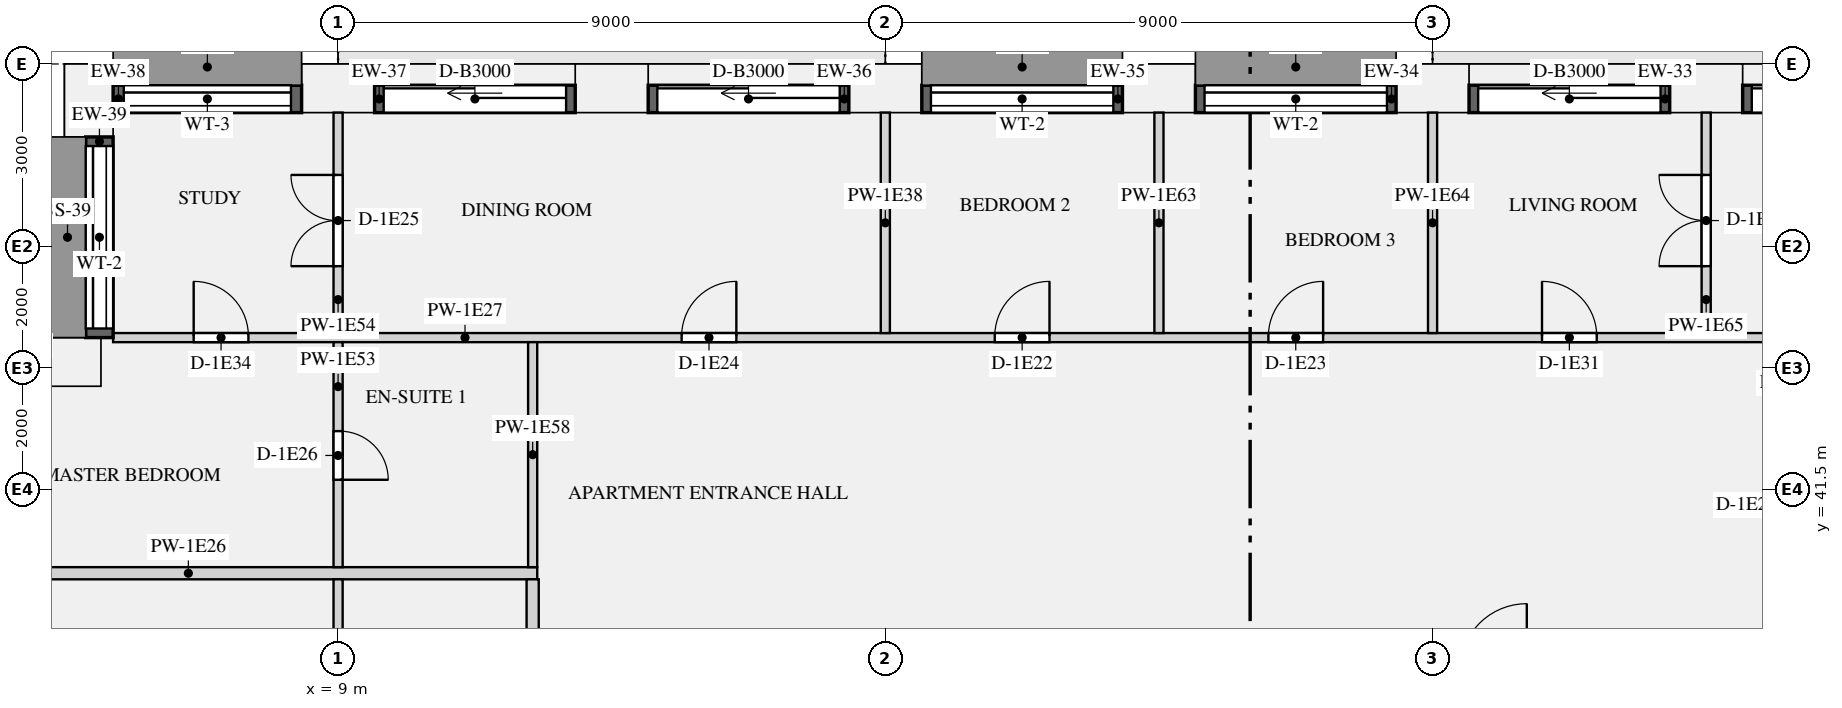
"""IFC4 building model, lengths in metres.
Left out: names, types, materials, properties, quantities, classifications, styles, units other than length and angle.
Written with IfcOpenShell. Run it as: python <this file> out.ifc"""

import sys

from ifc_helpers import new_model, si_unit, direction, frame, frame_2d, origin, origin_2d, place, context, subcontext, project, spatial, rectangle, extrude, element, fill, save


model = new_model("IFC4")
c1 = context("Model", 3, precision=1e-05, world=origin(), true_north=direction((0.0, 1.0)))
c2 = subcontext(c1, "Body", "Model", "MODEL_VIEW")
j1 = project(units=[si_unit("LENGTHUNIT", "METRE"), si_unit("PLANEANGLEUNIT", "RADIAN")], contexts=[c1])
p1 = place(None, origin())
s1 = spatial("IfcSite", under=j1, at=p1, CompositionType="ELEMENT")
p2 = place(p1, origin())
s2 = spatial("IfcBuilding", under=s1, at=p2, CompositionType="ELEMENT")
p3 = place(p2, frame((0.0, 0.0, 54.15)))
s3 = spatial("IfcBuildingStorey", under=s2, at=p3, CompositionType="ELEMENT", Elevation=54.15)
for number, where, z_axis, x_axis in (
    (1, (31.5, 48.1, 0.0), (0.0, 0.0, 1.0), (-1.0, 0.0, 0.0)),
    (2, (27.0, 48.1, 0.0), (0.0, 0.0, 1.0), (-1.0, 0.0, 0.0)),
    (3, (22.5, 48.1, 0.0), (0.0, 0.0, 1.0), (-1.0, 0.0, 0.0)),
    (4, (18.0, 48.1, 0.0), (0.0, 0.0, 1.0), (-1.0, 0.0, 0.0)),
    (5, (13.5, 48.1, 0.0), (0.0, 0.0, 1.0), (-1.0, 0.0, 0.0)),
    (6, (9.0, 48.1, 0.0), (0.0, 0.0, 1.0), (-1.0, 0.0, 0.0)),
    (7, (4.9, 47.9, 0.0), (0.0, 0.0, 1.0), (0.0, -1.0, 0.0)),
    (8, (4.5, 43.6, 0.0), (0.0, 0.0, 1.0), (-1.0, 0.0, 0.0)),
):
    element("IfcColumn", number, at=place(p3, frame(where, z_axis=z_axis, x_axis=x_axis)), inside=s3, PredefinedType="USERDEFINED", context=c2, shape_type="SweptSolid", body=[
        extrude(rectangle(XDim=1.2, YDim=0.8, at=origin_2d()), origin(), (0.0, 0.0, 1.0), 3.15),
    ])
p4 = place(p3, frame((35.4, 47.925, 0.0), z_axis=(0.0, 0.0, 1.0), x_axis=(-1.0, 0.0, 0.0)))
e9 = element("IfcWall", 9, at=p4, inside=s3, PredefinedType="SOLIDWALL", context=c2, shape_type="SweptSolid", body=[
    extrude(rectangle(XDim=3.3, YDim=0.45, at=frame_2d((1.65, 0.0))), origin(), (0.0, 0.0, 1.0), 2.83),
])
p5 = place(p4, frame((0.15, 0.0, 0.0)))
e10 = element("IfcOpeningElement", 10, at=p5, cuts=e9, PredefinedType="OPENING", context=c2, shape_type="SweptSolid", body=[
    extrude(rectangle(XDim=3.0, YDim=2.3, at=frame_2d((1.5, 1.15))), frame((0.0, 0.235, 0.0), z_axis=(0.0, -1.0, 0.0), x_axis=(1.0, 0.0, 0.0)), (0.0, 0.0, 1.0), 0.47),
])
p6 = place(p3, frame((30.9, 47.925, 0.0), z_axis=(0.0, 0.0, 1.0), x_axis=(-1.0, 0.0, 0.0)))
e11 = element("IfcWall", 11, at=p6, inside=s3, PredefinedType="SOLIDWALL", context=c2, shape_type="SweptSolid", body=[
    extrude(rectangle(XDim=3.3, YDim=0.45, at=frame_2d((1.65, 0.0))), origin(), (0.0, 0.0, 1.0), 2.83),
])
p7 = place(p6, frame((0.15, 0.0, 0.0)))
e12 = element("IfcOpeningElement", 12, at=p7, cuts=e11, PredefinedType="OPENING", context=c2, shape_type="SweptSolid", body=[
    extrude(rectangle(XDim=3.0, YDim=2.3, at=frame_2d((1.5, 1.15))), frame((0.0, 0.235, 0.0), z_axis=(0.0, -1.0, 0.0), x_axis=(1.0, 0.0, 0.0)), (0.0, 0.0, 1.0), 0.47),
])
p8 = place(p3, frame((26.4, 47.925, 0.9), z_axis=(0.0, 0.0, 1.0), x_axis=(-1.0, 0.0, 0.0)))
e13 = element("IfcWall", 13, at=p8, inside=s3, PredefinedType="SOLIDWALL", context=c2, shape_type="SweptSolid", body=[
    extrude(rectangle(XDim=3.3, YDim=0.45, at=frame_2d((1.65, 0.0))), origin(), (0.0, 0.0, 1.0), 1.93),
])
p9 = place(p8, frame((0.15, 0.0, 0.15)))
e14 = element("IfcOpeningElement", 14, at=p9, cuts=e13, PredefinedType="OPENING", context=c2, shape_type="SweptSolid", body=[
    extrude(rectangle(XDim=3.0, YDim=1.5, at=frame_2d((1.5, 0.75))), frame((0.0, 0.235, 0.0), z_axis=(0.0, -1.0, 0.0), x_axis=(1.0, 0.0, 0.0)), (0.0, 0.0, 1.0), 0.47),
])
p10 = place(p3, frame((21.9, 47.925, 0.9), z_axis=(0.0, 0.0, 1.0), x_axis=(-1.0, 0.0, 0.0)))
e15 = element("IfcWall", 15, at=p10, inside=s3, PredefinedType="SOLIDWALL", context=c2, shape_type="SweptSolid", body=[
    extrude(rectangle(XDim=3.3, YDim=0.45, at=frame_2d((1.65, 0.0))), origin(), (0.0, 0.0, 1.0), 1.93),
])
p11 = place(p10, frame((0.15, 0.0, 0.15)))
e16 = element("IfcOpeningElement", 16, at=p11, cuts=e15, PredefinedType="OPENING", context=c2, shape_type="SweptSolid", body=[
    extrude(rectangle(XDim=3.0, YDim=1.5, at=frame_2d((1.5, 0.75))), frame((0.0, 0.235, 0.0), z_axis=(0.0, -1.0, 0.0), x_axis=(1.0, 0.0, 0.0)), (0.0, 0.0, 1.0), 0.47),
])
p12 = place(p3, frame((17.4, 47.925, 0.0), z_axis=(0.0, 0.0, 1.0), x_axis=(-1.0, 0.0, 0.0)))
e17 = element("IfcWall", 17, at=p12, inside=s3, PredefinedType="SOLIDWALL", context=c2, shape_type="SweptSolid", body=[
    extrude(rectangle(XDim=3.3, YDim=0.45, at=frame_2d((1.65, 0.0))), origin(), (0.0, 0.0, 1.0), 2.83),
])
p13 = place(p12, frame((0.15, 0.0, 0.0)))
e18 = element("IfcOpeningElement", 18, at=p13, cuts=e17, PredefinedType="OPENING", context=c2, shape_type="SweptSolid", body=[
    extrude(rectangle(XDim=3.0, YDim=2.3, at=frame_2d((1.5, 1.15))), frame((0.0, 0.235, 0.0), z_axis=(0.0, -1.0, 0.0), x_axis=(1.0, 0.0, 0.0)), (0.0, 0.0, 1.0), 0.47),
])
p14 = place(p3, frame((12.9, 47.925, 0.0), z_axis=(0.0, 0.0, 1.0), x_axis=(-1.0, 0.0, 0.0)))
e19 = element("IfcWall", 19, at=p14, inside=s3, PredefinedType="SOLIDWALL", context=c2, shape_type="SweptSolid", body=[
    extrude(rectangle(XDim=3.3, YDim=0.45, at=frame_2d((1.65, 0.0))), origin(), (0.0, 0.0, 1.0), 2.83),
])
p15 = place(p14, frame((0.15, 0.0, 0.0)))
e20 = element("IfcOpeningElement", 20, at=p15, cuts=e19, PredefinedType="OPENING", context=c2, shape_type="SweptSolid", body=[
    extrude(rectangle(XDim=3.0, YDim=2.3, at=frame_2d((1.5, 1.15))), frame((0.0, 0.235, 0.0), z_axis=(0.0, -1.0, 0.0), x_axis=(1.0, 0.0, 0.0)), (0.0, 0.0, 1.0), 0.47),
])
p16 = place(p3, frame((8.4, 47.925, 0.9), z_axis=(0.0, 0.0, 1.0), x_axis=(-1.0, 0.0, 0.0)))
e21 = element("IfcWall", 21, at=p16, inside=s3, PredefinedType="SOLIDWALL", context=c2, shape_type="SweptSolid", body=[
    extrude(rectangle(XDim=3.1, YDim=0.45, at=frame_2d((1.55, 0.0))), origin(), (0.0, 0.0, 1.0), 1.93),
])
p17 = place(p16, frame((0.175, 0.0, 0.15)))
e22 = element("IfcOpeningElement", 22, at=p17, cuts=e21, PredefinedType="OPENING", context=c2, shape_type="SweptSolid", body=[
    extrude(rectangle(XDim=2.75, YDim=1.5, at=frame_2d((1.375, 0.75))), frame((0.0, 0.235, 0.0), z_axis=(0.0, -1.0, 0.0), x_axis=(1.0, 0.0, 0.0)), (0.0, 0.0, 1.0), 0.47),
])
p18 = place(p3, frame((5.075, 47.3, 0.9), z_axis=(0.0, 0.0, 1.0), x_axis=(0.0, -1.0, 0.0)))
e23 = element("IfcWall", 23, at=p18, inside=s3, PredefinedType="SOLIDWALL", context=c2, shape_type="SweptSolid", body=[
    extrude(rectangle(XDim=3.3, YDim=0.45, at=frame_2d((1.65, 0.0))), origin(), (0.0, 0.0, 1.0), 1.93),
])
p19 = place(p18, frame((0.15, 0.0, 0.15)))
e24 = element("IfcOpeningElement", 24, at=p19, cuts=e23, PredefinedType="OPENING", context=c2, shape_type="SweptSolid", body=[
    extrude(rectangle(XDim=3.0, YDim=1.5, at=frame_2d((1.5, 0.75))), frame((0.0, 0.235, 0.0), z_axis=(0.0, -1.0, 0.0), x_axis=(1.0, 0.0, 0.0)), (0.0, 0.0, 1.0), 0.47),
])
p20 = place(p3, frame((0.8, 40.125, 0.0), z_axis=(0.0, 0.0, 1.0), x_axis=(1.0, 0.0, 0.0)))
e25 = element("IfcWall", 25, at=p20, inside=s3, PredefinedType="PARTITIONING", context=c2, shape_type="SweptSolid", body=[
    extrude(rectangle(XDim=11.475, YDim=0.2, at=frame_2d((5.737, 0.0))), origin(), (0.0, 0.0, 1.0), 2.83),
])
p21 = place(p3, frame((5.3, 44.0, 0.0), z_axis=(0.0, 0.0, 1.0), x_axis=(1.0, 0.0, 0.0)))
e26 = element("IfcWall", 26, at=p21, inside=s3, PredefinedType="PARTITIONING", context=c2, shape_type="SweptSolid", body=[
    extrude(rectangle(XDim=27.775, YDim=0.15, at=frame_2d((13.887, 0.0))), origin(), (0.0, 0.0, 1.0), 2.83),
])
p22 = place(p21, frame((14.5, 0.0, 0.0)))
e27 = element("IfcOpeningElement", 27, at=p22, cuts=e26, PredefinedType="OPENING", context=c2, shape_type="SweptSolid", body=[
    extrude(rectangle(XDim=0.9, YDim=2.1, at=frame_2d((0.45, 1.05))), frame((0.0, 0.085, 0.0), z_axis=(0.0, -1.0, 0.0), x_axis=(1.0, 0.0, 0.0)), (0.0, 0.0, 1.0), 0.17),
])
p23 = place(p21, frame((19.0, 0.0, 0.0)))
e28 = element("IfcOpeningElement", 28, at=p23, cuts=e26, PredefinedType="OPENING", context=c2, shape_type="SweptSolid", body=[
    extrude(rectangle(XDim=0.9, YDim=2.1, at=frame_2d((0.45, 1.05))), frame((0.0, 0.085, 0.0), z_axis=(0.0, -1.0, 0.0), x_axis=(1.0, 0.0, 0.0)), (0.0, 0.0, 1.0), 0.17),
])
p24 = place(p21, frame((9.35, 0.0, 0.0)))
e29 = element("IfcOpeningElement", 29, at=p24, cuts=e26, PredefinedType="OPENING", context=c2, shape_type="SweptSolid", body=[
    extrude(rectangle(XDim=0.9, YDim=2.1, at=frame_2d((0.45, 1.05))), frame((0.0, 0.085, 0.0), z_axis=(0.0, -1.0, 0.0), x_axis=(1.0, 0.0, 0.0)), (0.0, 0.0, 1.0), 0.17),
])
p25 = place(p21, frame((23.5, 0.0, 0.0)))
e30 = element("IfcOpeningElement", 30, at=p25, cuts=e26, PredefinedType="OPENING", context=c2, shape_type="SweptSolid", body=[
    extrude(rectangle(XDim=0.9, YDim=2.1, at=frame_2d((0.45, 1.05))), frame((0.0, 0.085, 0.0), z_axis=(0.0, -1.0, 0.0), x_axis=(1.0, 0.0, 0.0)), (0.0, 0.0, 1.0), 0.17),
])
p26 = place(p21, frame((1.325, 0.0, 0.0)))
e31 = element("IfcOpeningElement", 31, at=p26, cuts=e26, PredefinedType="OPENING", context=c2, shape_type="SweptSolid", body=[
    extrude(rectangle(XDim=0.9, YDim=2.1, at=frame_2d((0.45, 1.05))), frame((0.0, 0.085, 0.0), z_axis=(0.0, -1.0, 0.0), x_axis=(1.0, 0.0, 0.0)), (0.0, 0.0, 1.0), 0.17),
])
p27 = place(p3, frame((18.0, 44.075, 0.0), z_axis=(0.0, 0.0, 1.0), x_axis=(0.0, 1.0, 0.0)))
e32 = element("IfcWall", 32, at=p27, inside=s3, PredefinedType="PARTITIONING", context=c2, shape_type="SweptSolid", body=[
    extrude(rectangle(XDim=3.625, YDim=0.15, at=frame_2d((1.812, 0.0))), origin(), (0.0, 0.0, 1.0), 2.83),
])
p28 = place(p3, frame((9.0, 32.45, 0.0), z_axis=(0.0, 0.0, 1.0), x_axis=(0.0, 1.0, 0.0)))
e33 = element("IfcWall", 33, at=p28, inside=s3, PredefinedType="PARTITIONING", context=c2, shape_type="SweptSolid", body=[
    extrude(rectangle(XDim=7.575, YDim=0.15, at=frame_2d((3.788, 0.0))), origin(), (0.0, 0.0, 1.0), 2.83),
])
p29 = place(p28, frame((4.988, 0.0, 0.0)))
e34 = element("IfcOpeningElement", 34, at=p29, cuts=e33, PredefinedType="OPENING", context=c2, shape_type="SweptSolid", body=[
    extrude(rectangle(XDim=1.5, YDim=2.1, at=frame_2d((0.75, 1.05))), frame((0.0, 0.085, 0.0), z_axis=(0.0, -1.0, 0.0), x_axis=(1.0, 0.0, 0.0)), (0.0, 0.0, 1.0), 0.17),
])
p30 = place(p3, frame((9.0, 40.225, 0.0), z_axis=(0.0, 0.0, 1.0), x_axis=(0.0, 1.0, 0.0)))
e35 = element("IfcWall", 35, at=p30, inside=s3, PredefinedType="PARTITIONING", context=c2, shape_type="SweptSolid", body=[
    extrude(rectangle(XDim=3.7, YDim=0.15, at=frame_2d((1.85, 0.0))), origin(), (0.0, 0.0, 1.0), 2.83),
])
p31 = place(p30, frame((1.437, 0.0, 0.0)))
e36 = element("IfcOpeningElement", 36, at=p31, cuts=e35, PredefinedType="OPENING", context=c2, shape_type="SweptSolid", body=[
    extrude(rectangle(XDim=0.8, YDim=2.1, at=frame_2d((0.4, 1.05))), frame((0.0, 0.085, 0.0), z_axis=(0.0, -1.0, 0.0), x_axis=(1.0, 0.0, 0.0)), (0.0, 0.0, 1.0), 0.17),
])
p32 = place(p3, frame((9.0, 44.075, 0.0), z_axis=(0.0, 0.0, 1.0), x_axis=(0.0, 1.0, 0.0)))
e37 = element("IfcWall", 37, at=p32, inside=s3, PredefinedType="PARTITIONING", context=c2, shape_type="SweptSolid", body=[
    extrude(rectangle(XDim=3.625, YDim=0.15, at=frame_2d((1.812, 0.0))), origin(), (0.0, 0.0, 1.0), 2.83),
])
p33 = place(p32, frame((1.1, 0.0, 0.0)))
e38 = element("IfcOpeningElement", 38, at=p33, cuts=e37, PredefinedType="OPENING", context=c2, shape_type="SweptSolid", body=[
    extrude(rectangle(XDim=1.5, YDim=2.1, at=frame_2d((0.75, 1.05))), frame((0.0, 0.085, 0.0), z_axis=(0.0, -1.0, 0.0), x_axis=(1.0, 0.0, 0.0)), (0.0, 0.0, 1.0), 0.17),
])
p34 = place(p3, frame((12.2, 40.225, 0.0), z_axis=(0.0, 0.0, 1.0), x_axis=(0.0, 1.0, 0.0)))
e39 = element("IfcWall", 39, at=p34, inside=s3, PredefinedType="PARTITIONING", context=c2, shape_type="SweptSolid", body=[
    extrude(rectangle(XDim=3.7, YDim=0.15, at=frame_2d((1.85, 0.0))), origin(), (0.0, 0.0, 1.0), 2.83),
])
p35 = place(p3, frame((12.2, 35.4, 0.0), z_axis=(0.0, 0.0, 1.0), x_axis=(0.0, 1.0, 0.0)))
e40 = element("IfcWall", 40, at=p35, inside=s3, PredefinedType="PARTITIONING", context=c2, shape_type="SweptSolid", body=[
    extrude(rectangle(XDim=4.625, YDim=0.2, at=frame_2d((2.312, 0.0))), origin(), (0.0, 0.0, 1.0), 2.83),
])
for number, where, z_axis, x_axis in (
    (41, (22.5, 44.075, 0.0), (0.0, 0.0, 1.0), (0.0, 1.0, 0.0)),
    (42, (27.0, 44.075, 0.0), (0.0, 0.0, 1.0), (0.0, 1.0, 0.0)),
):
    element("IfcWall", number, at=place(p3, frame(where, z_axis=z_axis, x_axis=x_axis)), inside=s3, PredefinedType="PARTITIONING", context=c2, shape_type="SweptSolid", body=[
        extrude(rectangle(XDim=3.625, YDim=0.15, at=frame_2d((1.812, 0.0))), origin(), (0.0, 0.0, 1.0), 2.83),
    ])
p36 = place(p3, frame((31.5, 44.075, 0.0), z_axis=(0.0, 0.0, 1.0), x_axis=(0.0, 1.0, 0.0)))
e43 = element("IfcWall", 43, at=p36, inside=s3, PredefinedType="PARTITIONING", context=c2, shape_type="SweptSolid", body=[
    extrude(rectangle(XDim=3.625, YDim=0.15, at=frame_2d((1.812, 0.0))), origin(), (0.0, 0.0, 1.0), 2.83),
])
p37 = place(p36, frame((1.1, 0.0, 0.0)))
e44 = element("IfcOpeningElement", 44, at=p37, cuts=e43, PredefinedType="OPENING", context=c2, shape_type="SweptSolid", body=[
    extrude(rectangle(XDim=1.5, YDim=2.1, at=frame_2d((0.75, 1.05))), frame((0.0, 0.085, 0.0), z_axis=(0.0, -1.0, 0.0), x_axis=(1.0, 0.0, 0.0)), (0.0, 0.0, 1.0), 0.17),
])
p38 = place(p5, origin())
e45 = element("IfcDoor", 45, at=p38, inside=s3, OperationType="SLIDING_TO_LEFT", PredefinedType="DOOR", context=c2, shape_type="SweptSolid", body=[
    extrude(rectangle(XDim=3.0, YDim=2.3, at=frame_2d((1.5, 1.15))), frame((0.0, -0.07, 0.0), z_axis=(0.0, -1.0, 0.0), x_axis=(1.0, 0.0, 0.0)), (0.0, 0.0, 1.0), 0.05),
])
fill(e10, e45)
p39 = place(p7, origin())
e46 = element("IfcDoor", 46, at=p39, inside=s3, OperationType="SLIDING_TO_LEFT", PredefinedType="DOOR", context=c2, shape_type="SweptSolid", body=[
    extrude(rectangle(XDim=3.0, YDim=2.3, at=frame_2d((1.5, 1.15))), frame((0.0, -0.07, 0.0), z_axis=(0.0, -1.0, 0.0), x_axis=(1.0, 0.0, 0.0)), (0.0, 0.0, 1.0), 0.05),
])
fill(e12, e46)
p40 = place(p9, origin())
e47 = element("IfcWindow", 47, at=p40, inside=s3, PartitioningType="SINGLE_PANEL", PredefinedType="WINDOW", context=c2, shape_type="SweptSolid", body=[
    extrude(rectangle(XDim=3.0, YDim=1.5, at=frame_2d((1.5, 0.75))), frame((0.0, -0.065, 0.0), z_axis=(0.0, -1.0, 0.0), x_axis=(1.0, 0.0, 0.0)), (0.0, 0.0, 1.0), 0.06),
])
fill(e14, e47)
p41 = place(p11, origin())
e48 = element("IfcWindow", 48, at=p41, inside=s3, PartitioningType="SINGLE_PANEL", PredefinedType="WINDOW", context=c2, shape_type="SweptSolid", body=[
    extrude(rectangle(XDim=3.0, YDim=1.5, at=frame_2d((1.5, 0.75))), frame((0.0, -0.065, 0.0), z_axis=(0.0, -1.0, 0.0), x_axis=(1.0, 0.0, 0.0)), (0.0, 0.0, 1.0), 0.06),
])
fill(e16, e48)
p42 = place(p13, origin())
e49 = element("IfcDoor", 49, at=p42, inside=s3, OperationType="SLIDING_TO_LEFT", PredefinedType="DOOR", context=c2, shape_type="SweptSolid", body=[
    extrude(rectangle(XDim=3.0, YDim=2.3, at=frame_2d((1.5, 1.15))), frame((0.0, -0.07, 0.0), z_axis=(0.0, -1.0, 0.0), x_axis=(1.0, 0.0, 0.0)), (0.0, 0.0, 1.0), 0.05),
])
fill(e18, e49)
p43 = place(p15, origin())
e50 = element("IfcDoor", 50, at=p43, inside=s3, OperationType="SLIDING_TO_LEFT", PredefinedType="DOOR", context=c2, shape_type="SweptSolid", body=[
    extrude(rectangle(XDim=3.0, YDim=2.3, at=frame_2d((1.5, 1.15))), frame((0.0, -0.07, 0.0), z_axis=(0.0, -1.0, 0.0), x_axis=(1.0, 0.0, 0.0)), (0.0, 0.0, 1.0), 0.05),
])
fill(e20, e50)
p44 = place(p17, origin())
e51 = element("IfcWindow", 51, at=p44, inside=s3, PartitioningType="SINGLE_PANEL", PredefinedType="WINDOW", context=c2, shape_type="SweptSolid", body=[
    extrude(rectangle(XDim=2.75, YDim=1.5, at=frame_2d((1.375, 0.75))), frame((0.0, -0.065, 0.0), z_axis=(0.0, -1.0, 0.0), x_axis=(1.0, 0.0, 0.0)), (0.0, 0.0, 1.0), 0.06),
])
fill(e22, e51)
p45 = place(p19, origin())
e52 = element("IfcWindow", 52, at=p45, inside=s3, PartitioningType="SINGLE_PANEL", PredefinedType="WINDOW", context=c2, shape_type="SweptSolid", body=[
    extrude(rectangle(XDim=3.0, YDim=1.5, at=frame_2d((1.5, 0.75))), frame((0.0, -0.065, 0.0), z_axis=(0.0, -1.0, 0.0), x_axis=(1.0, 0.0, 0.0)), (0.0, 0.0, 1.0), 0.06),
])
fill(e24, e52)
p46 = place(p22, origin())
e53 = element("IfcDoor", 53, at=p46, inside=s3, OperationType="SINGLE_SWING_RIGHT", PredefinedType="DOOR", context=c2, shape_type="SweptSolid", body=[
    extrude(rectangle(XDim=0.9, YDim=2.1, at=frame_2d((0.45, 1.05))), frame((0.0, 0.025, 0.0), z_axis=(0.0, -1.0, 0.0), x_axis=(1.0, 0.0, 0.0)), (0.0, 0.0, 1.0), 0.05),
])
fill(e27, e53)
p47 = place(p23, origin())
e54 = element("IfcDoor", 54, at=p47, inside=s3, OperationType="SINGLE_SWING_RIGHT", PredefinedType="DOOR", context=c2, shape_type="SweptSolid", body=[
    extrude(rectangle(XDim=0.9, YDim=2.1, at=frame_2d((0.45, 1.05))), frame((0.0, 0.025, 0.0), z_axis=(0.0, -1.0, 0.0), x_axis=(1.0, 0.0, 0.0)), (0.0, 0.0, 1.0), 0.05),
])
fill(e28, e54)
p48 = place(p24, origin())
e55 = element("IfcDoor", 55, at=p48, inside=s3, OperationType="SINGLE_SWING_RIGHT", PredefinedType="DOOR", context=c2, shape_type="SweptSolid", body=[
    extrude(rectangle(XDim=0.9, YDim=2.1, at=frame_2d((0.45, 1.05))), frame((0.0, 0.025, 0.0), z_axis=(0.0, -1.0, 0.0), x_axis=(1.0, 0.0, 0.0)), (0.0, 0.0, 1.0), 0.05),
])
fill(e29, e55)
p49 = place(p33, origin())
e56 = element("IfcDoor", 56, at=p49, inside=s3, OperationType="DOUBLE_DOOR_SINGLE_SWING", PredefinedType="DOOR", context=c2, shape_type="SweptSolid", body=[
    extrude(rectangle(XDim=1.5, YDim=2.1, at=frame_2d((0.75, 1.05))), frame((0.0, 0.025, 0.0), z_axis=(0.0, -1.0, 0.0), x_axis=(1.0, 0.0, 0.0)), (0.0, 0.0, 1.0), 0.05),
])
fill(e38, e56)
p50 = place(p31, frame((0.8, 0.0, 0.0), z_axis=(0.0, 0.0, 1.0), x_axis=(-1.0, 0.0, 0.0)))
e57 = element("IfcDoor", 57, at=p50, inside=s3, OperationType="SINGLE_SWING_RIGHT", PredefinedType="DOOR", context=c2, shape_type="SweptSolid", body=[
    extrude(rectangle(XDim=0.8, YDim=2.1, at=frame_2d((0.4, 1.05))), frame((0.0, 0.025, 0.0), z_axis=(0.0, -1.0, 0.0), x_axis=(1.0, 0.0, 0.0)), (0.0, 0.0, 1.0), 0.05),
])
fill(e36, e57)
p51 = place(p37, origin())
e58 = element("IfcDoor", 58, at=p51, inside=s3, OperationType="DOUBLE_DOOR_SINGLE_SWING", PredefinedType="DOOR", context=c2, shape_type="SweptSolid", body=[
    extrude(rectangle(XDim=1.5, YDim=2.1, at=frame_2d((0.75, 1.05))), frame((0.0, 0.025, 0.0), z_axis=(0.0, -1.0, 0.0), x_axis=(1.0, 0.0, 0.0)), (0.0, 0.0, 1.0), 0.05),
])
fill(e44, e58)
p52 = place(p25, origin())
e59 = element("IfcDoor", 59, at=p52, inside=s3, OperationType="SINGLE_SWING_LEFT", PredefinedType="DOOR", context=c2, shape_type="SweptSolid", body=[
    extrude(rectangle(XDim=0.9, YDim=2.1, at=frame_2d((0.45, 1.05))), frame((0.0, 0.025, 0.0), z_axis=(0.0, -1.0, 0.0), x_axis=(1.0, 0.0, 0.0)), (0.0, 0.0, 1.0), 0.05),
])
fill(e30, e59)
p53 = place(p26, origin())
e60 = element("IfcDoor", 60, at=p53, inside=s3, OperationType="SINGLE_SWING_LEFT", PredefinedType="DOOR", context=c2, shape_type="SweptSolid", body=[
    extrude(rectangle(XDim=0.9, YDim=2.1, at=frame_2d((0.45, 1.05))), frame((0.0, 0.025, 0.0), z_axis=(0.0, -1.0, 0.0), x_axis=(1.0, 0.0, 0.0)), (0.0, 0.0, 1.0), 0.05),
])
fill(e31, e60)
save(model, sys.argv[1])
